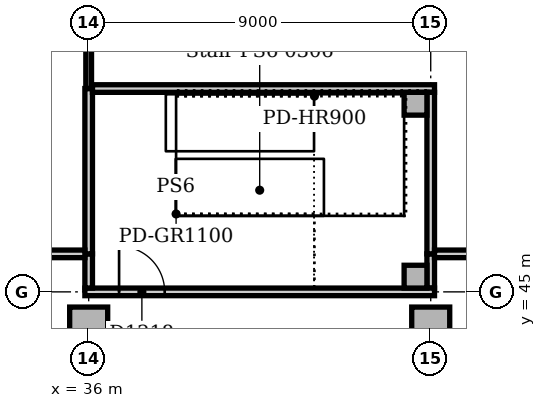
"""IFC4 building model, lengths in metres.
Left out: names, types, materials, properties, quantities, classifications, styles, units other than length and angle.
Written with IfcOpenShell. Run it as: python <this file> out.ifc"""

import sys

from ifc_helpers import new_model, si_unit, direction, frame, frame_2d, origin, origin_2d, place, context, subcontext, project, spatial, rectangle, extrude, element, fill, save


model = new_model("IFC4")
c1 = context("Model", 3, precision=1e-05, world=origin(), true_north=direction((0.0, 1.0)))
c2 = subcontext(c1, "Body", "Model", "MODEL_VIEW")
j1 = project(units=[si_unit("LENGTHUNIT", "METRE"), si_unit("PLANEANGLEUNIT", "RADIAN")], contexts=[c1])
p1 = place(None, origin())
s1 = spatial("IfcSite", under=j1, at=p1, CompositionType="ELEMENT")
p2 = place(p1, origin())
s2 = spatial("IfcBuilding", under=s1, at=p2, CompositionType="ELEMENT")
p3 = place(p2, frame((0.0, 0.0, 16.0)))
s3 = spatial("IfcBuildingStorey", under=s2, at=p3, CompositionType="ELEMENT", Elevation=16.0)
for number, where, z_axis, x_axis in (
    (1, (36.0, 44.1, 0.0), (0.0, 0.0, 1.0), (1.0, 0.0, 0.0)),
    (2, (45.0, 44.1, 0.0), (0.0, 0.0, 1.0), (1.0, 0.0, 0.0)),
):
    element("IfcColumn", number, at=place(p3, frame(where, z_axis=z_axis, x_axis=x_axis)), inside=s3, PredefinedType="COLUMN", context=c2, shape_type="SweptSolid", body=[
        extrude(rectangle(XDim=1.0, YDim=1.0, at=origin_2d()), origin(), (0.0, 0.0, 1.0), 4.7),
    ])
for number, where, z_axis, x_axis in (
    (3, (44.6, 49.95, 0.0), (0.0, 0.0, 1.0), (1.0, 0.0, 0.0)),
    (4, (44.6, 45.4, 0.0), (0.0, 0.0, 1.0), (1.0, 0.0, 0.0)),
):
    element("IfcColumn", number, at=place(p3, frame(where, z_axis=z_axis, x_axis=x_axis)), inside=s3, PredefinedType="COLUMN", context=c2, shape_type="SweptSolid", body=[
        extrude(rectangle(XDim=0.6, YDim=0.6, at=origin_2d()), origin(), (0.0, 0.0, 1.0), 5.0),
    ])
p4 = place(p3, frame((45.0, 45.1, 0.0), z_axis=(0.0, 0.0, 1.0), x_axis=(0.0, 1.0, 0.0)))
e5 = element("IfcWall", 5, at=p4, inside=s3, PredefinedType="SOLIDWALL", context=c2, shape_type="SweptSolid", body=[
    extrude(rectangle(XDim=0.9, YDim=0.2, at=frame_2d((0.45, 0.0))), origin(), (0.0, 0.0, 1.0), 4.7),
])
p5 = place(p3, frame((35.9, 45.0, 0.0), z_axis=(0.0, 0.0, 1.0), x_axis=(1.0, 0.0, 0.0)))
e6 = element("IfcWall", 6, at=p5, inside=s3, PredefinedType="SOLIDWALL", context=c2, shape_type="SweptSolid", body=[
    extrude(rectangle(XDim=9.2, YDim=0.2, at=frame_2d((4.6, 0.0))), origin(), (0.0, 0.0, 1.0), 4.7),
])
p6 = place(p5, frame((0.9, 0.0, 0.0)))
e7 = element("IfcOpeningElement", 7, at=p6, cuts=e6, PredefinedType="OPENING", context=c2, shape_type="SweptSolid", body=[
    extrude(rectangle(XDim=1.2, YDim=2.1, at=frame_2d((0.6, 1.05))), frame((0.0, 0.11, 0.0), z_axis=(0.0, -1.0, 0.0), x_axis=(1.0, 0.0, 0.0)), (0.0, 0.0, 1.0), 0.22),
])
p7 = place(p3, frame((36.0, 45.1, 0.0), z_axis=(0.0, 0.0, 1.0), x_axis=(0.0, 1.0, 0.0)))
e8 = element("IfcWall", 8, at=p7, inside=s3, PredefinedType="SOLIDWALL", context=c2, shape_type="SweptSolid", body=[
    extrude(rectangle(XDim=0.9, YDim=0.2, at=frame_2d((0.45, 0.0))), origin(), (0.0, 0.0, 1.0), 4.7),
])
p8 = place(p3, frame((36.0, 46.0, 0.0), z_axis=(0.0, 0.0, 1.0), x_axis=(0.0, 1.0, 0.0)))
e9 = element("IfcWall", 9, at=p8, inside=s3, PredefinedType="SOLIDWALL", context=c2, shape_type="SweptSolid", body=[
    extrude(rectangle(XDim=4.35, YDim=0.2, at=frame_2d((2.175, 0.0))), origin(), (0.0, 0.0, 1.0), 4.7),
])
p9 = place(p3, frame((36.1, 50.35, 0.0), z_axis=(0.0, 0.0, 1.0), x_axis=(1.0, 0.0, 0.0)))
e10 = element("IfcWall", 10, at=p9, inside=s3, PredefinedType="SOLIDWALL", context=c2, shape_type="SweptSolid", body=[
    extrude(rectangle(XDim=9.0, YDim=0.2, at=frame_2d((4.5, 0.0))), origin(), (0.0, 0.0, 1.0), 4.7),
])
p10 = place(p3, frame((45.0, 46.0, 0.0), z_axis=(0.0, 0.0, 1.0), x_axis=(0.0, 1.0, 0.0)))
e11 = element("IfcWall", 11, at=p10, inside=s3, PredefinedType="SOLIDWALL", context=c2, shape_type="SweptSolid", body=[
    extrude(rectangle(XDim=4.25, YDim=0.2, at=frame_2d((2.125, 0.0))), origin(), (0.0, 0.0, 1.0), 4.7),
])
p11 = place(p3, frame((27.0, 46.0, 0.0), z_axis=(0.0, 0.0, 1.0), x_axis=(1.0, 0.0, 0.0)))
e12 = element("IfcWall", 12, at=p11, inside=s3, PredefinedType="PARTITIONING", context=c2, shape_type="SweptSolid", body=[
    extrude(rectangle(XDim=8.9, YDim=0.2, at=frame_2d((4.45, 0.0))), origin(), (0.0, 0.0, 1.0), 4.7),
])
p12 = place(p11, frame((4.0, 0.0, 0.0)))
e13 = element("IfcOpeningElement", 13, at=p12, cuts=e12, PredefinedType="OPENING", context=c2, shape_type="SweptSolid", body=[
    extrude(rectangle(XDim=1.0, YDim=2.1, at=frame_2d((0.5, 1.05))), frame((0.0, 0.11, 0.0), z_axis=(0.0, -1.0, 0.0), x_axis=(1.0, 0.0, 0.0)), (0.0, 0.0, 1.0), 0.22),
])
p13 = place(p3, frame((45.1, 46.0, 0.0), z_axis=(0.0, 0.0, 1.0), x_axis=(1.0, 0.0, 0.0)))
e14 = element("IfcWall", 14, at=p13, inside=s3, PredefinedType="PARTITIONING", context=c2, shape_type="SweptSolid", body=[
    extrude(rectangle(XDim=8.8, YDim=0.2, at=frame_2d((4.4, 0.0))), origin(), (0.0, 0.0, 1.0), 4.7),
])
p14 = place(p13, frame((3.5, 0.0, 0.0)))
e15 = element("IfcOpeningElement", 15, at=p14, cuts=e14, PredefinedType="OPENING", context=c2, shape_type="SweptSolid", body=[
    extrude(rectangle(XDim=1.8, YDim=2.1, at=frame_2d((0.9, 1.05))), frame((0.0, 0.11, 0.0), z_axis=(0.0, -1.0, 0.0), x_axis=(1.0, 0.0, 0.0)), (0.0, 0.0, 1.0), 0.22),
])
p15 = place(p3, frame((36.0, 50.35, 0.0), z_axis=(0.0, 0.0, 1.0), x_axis=(0.0, 1.0, 0.0)))
e16 = element("IfcWall", 16, at=p15, inside=s3, PredefinedType="PARTITIONING", context=c2, shape_type="SweptSolid", body=[
    extrude(rectangle(XDim=3.18, YDim=0.15, at=frame_2d((1.59, 0.0))), origin(), (0.0, 0.0, 1.0), 4.7),
])
p16 = place(p6, origin())
e17 = element("IfcDoor", 17, at=p16, inside=s3, OperationType="SINGLE_SWING_LEFT", PredefinedType="DOOR", context=c2, shape_type="SweptSolid", body=[
    extrude(rectangle(XDim=1.2, YDim=2.1, at=frame_2d((0.6, 1.05))), frame((0.0, 0.025, 0.0), z_axis=(0.0, -1.0, 0.0), x_axis=(1.0, 0.0, 0.0)), (0.0, 0.0, 1.0), 0.05),
])
fill(e7, e17)
save(model, sys.argv[1])
